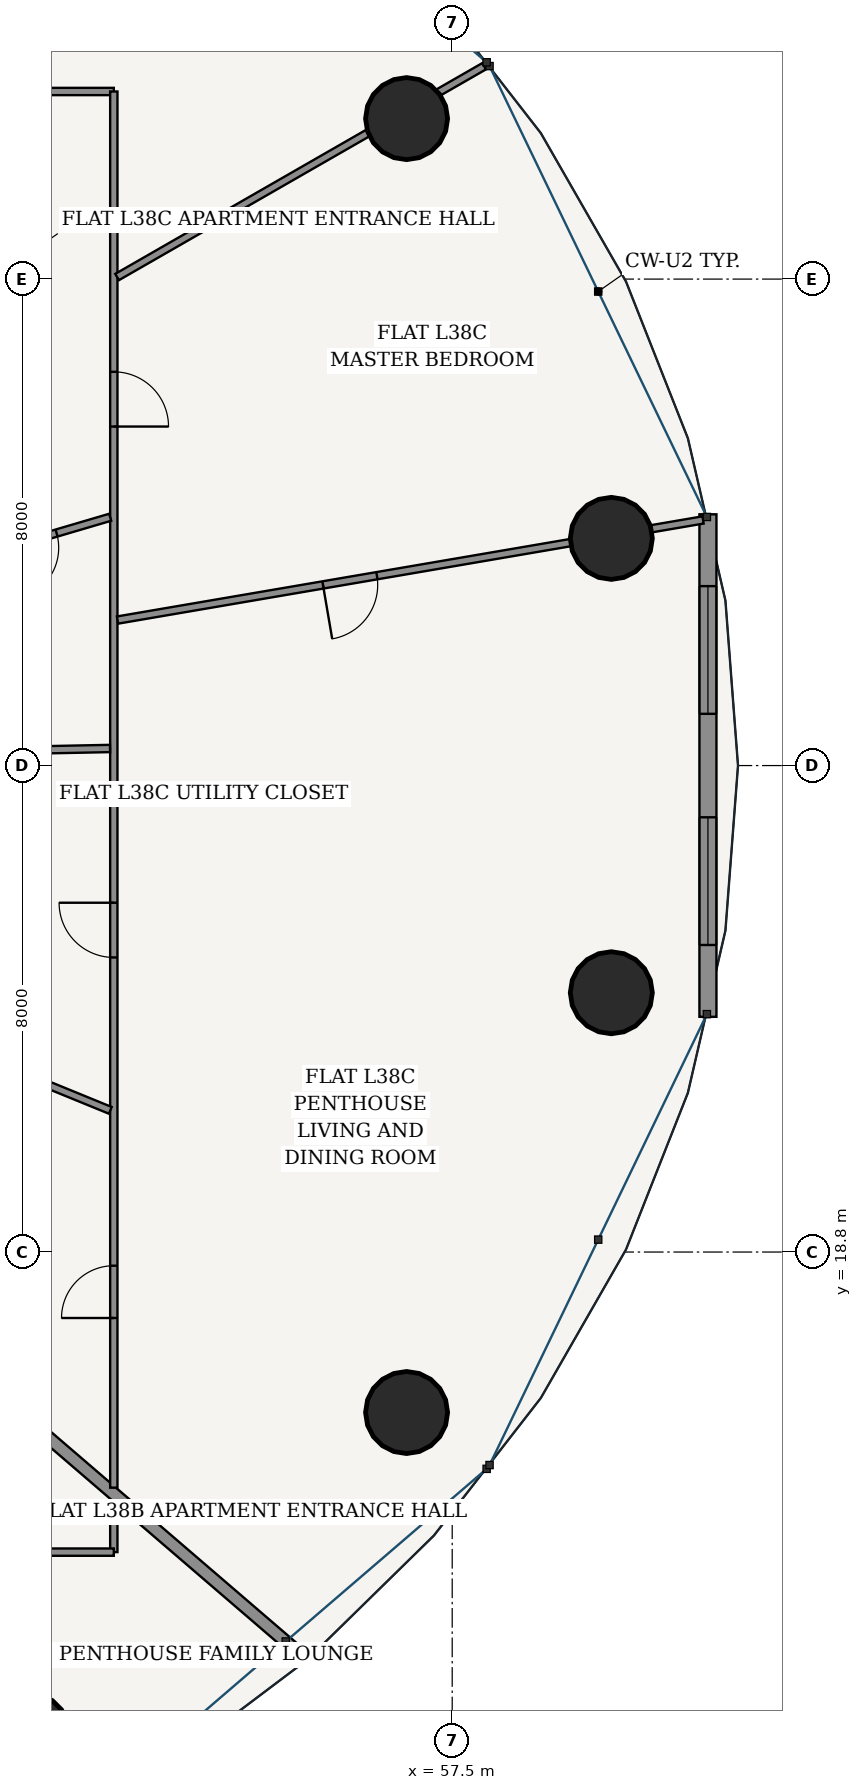
"""IFC4 building model, lengths in metres.
Left out: names, types, materials, properties, quantities, classifications, styles, units other than length and angle.
Written with IfcOpenShell. Run it as: python <this file> out.ifc"""

import sys

from ifc_helpers import new_model, si_unit, direction, frame, frame_2d, origin, origin_2d, place, context, subcontext, project, spatial, rectangle, hollow_circle, extrude, source, transform, mapped, element, fill, save


model = new_model("IFC4")
c1 = context("Model", 3, precision=1e-05, world=origin(), true_north=direction((-0.2419218956, 0.970295726276)))
c2 = subcontext(c1, "Body", "Model", "MODEL_VIEW")
j1 = project(units=[si_unit("LENGTHUNIT", "METRE"), si_unit("PLANEANGLEUNIT", "RADIAN")], contexts=[c1])
p1 = place(None, origin())
s1 = spatial("IfcSite", under=j1, at=p1, CompositionType="ELEMENT")
p2 = place(p1, origin())
s2 = spatial("IfcBuilding", under=s1, at=p2, CompositionType="ELEMENT")
p3 = place(p2, frame((0.0, 0.0, 146.2)))
s3 = spatial("IfcBuildingStorey", under=s2, at=p3, CompositionType="ELEMENT", Elevation=146.2)
for number, where, z_axis, x_axis in (
    (1, (60.117, 30.536, 0.0), (0.0, 0.0, 1.0), (1.0, 0.0, 0.0)),
    (2, (56.75, 37.439, 0.0), (0.0, 0.0, 1.0), (1.0, 0.0, 0.0)),
    (3, (50.528, 10.877, 0.0), (0.0, 0.0, 1.0), (1.0, 0.0, 0.0)),
    (4, (56.75, 16.161, 0.0), (0.0, 0.0, 1.0), (1.0, 0.0, 0.0)),
    (5, (60.117, 23.064, 0.0), (0.0, 0.0, 1.0), (1.0, 0.0, 0.0)),
):
    element("IfcColumn", number, at=place(p3, frame(where, z_axis=z_axis, x_axis=x_axis)), inside=s3, PredefinedType="COLUMN", context=c2, shape_type="SweptSolid", body=[
        extrude(hollow_circle(Radius=0.675, WallThickness=0.042, at=origin_2d()), origin(), (0.0, 0.0, 1.0), 3.6),
    ])
p4 = place(p3, frame((61.706, 22.668, 0.0), z_axis=(0.0, 0.0, 1.0), x_axis=(0.0, 1.0, 0.0)))
e6 = element("IfcWall", 6, at=p4, inside=s3, PredefinedType="SOLIDWALL", context=c2, shape_type="SweptSolid", body=[
    extrude(rectangle(XDim=8.264, YDim=0.28, at=frame_2d((4.132, 0.0))), origin(), (0.0, 0.0, 1.0), 3.33),
])
p5 = place(p4, frame((1.181, 0.0, 0.85)))
e7 = element("IfcOpeningElement", 7, at=p5, cuts=e6, PredefinedType="OPENING", context=c2, shape_type="SweptSolid", body=[
    extrude(rectangle(XDim=2.1, YDim=1.95, at=frame_2d((1.05, 0.975))), frame((0.0, 0.15, 0.0), z_axis=(0.0, -1.0, 0.0), x_axis=(1.0, 0.0, 0.0)), (0.0, 0.0, 1.0), 0.3),
])
p6 = place(p4, frame((4.983, 0.0, 0.85)))
e8 = element("IfcOpeningElement", 8, at=p6, cuts=e6, PredefinedType="OPENING", context=c2, shape_type="SweptSolid", body=[
    extrude(rectangle(XDim=2.1, YDim=1.95, at=frame_2d((1.05, 0.975))), frame((0.0, 0.15, 0.0), z_axis=(0.0, -1.0, 0.0), x_axis=(1.0, 0.0, 0.0)), (0.0, 0.0, 1.0), 0.3),
])
p7 = place(p3, frame((51.935, 14.721, 0.0), z_axis=(0.0, 0.0, 1.0), x_axis=(0.0, -1.0, 0.0)))
e9 = element("IfcWall", 9, at=p7, inside=s3, PredefinedType="PARTITIONING", context=c2, shape_type="SweptSolid", body=[
    extrude(rectangle(XDim=0.856, YDim=0.12, at=frame_2d((0.428, 0.0))), origin(), (0.0, 0.0, 1.0), 3.33),
])
p8 = place(p3, frame((51.935, 13.865, 0.0), z_axis=(0.0, 0.0, 1.0), x_axis=(-1.0, 0.0, 0.0)))
e10 = element("IfcWall", 10, at=p8, inside=s3, PredefinedType="PARTITIONING", context=c2, shape_type="SweptSolid", body=[
    extrude(rectangle(XDim=20.345, YDim=0.12, at=frame_2d((10.172, 0.0))), origin(), (0.0, 0.0, 1.0), 2.776),
])
p9 = place(p8, frame((2.985, 0.0, 0.0)))
e11 = element("IfcOpeningElement", 11, at=p9, cuts=e10, PredefinedType="OPENING", context=c2, shape_type="SweptSolid", body=[
    extrude(rectangle(XDim=0.9, YDim=2.15, at=frame_2d((0.45, 1.075))), frame((0.0, 0.07, 0.0), z_axis=(0.0, -1.0, 0.0), x_axis=(1.0, 0.0, 0.0)), (0.0, 0.0, 1.0), 0.14),
])
p10 = place(p8, frame((12.333, 0.0, 0.0)))
e12 = element("IfcOpeningElement", 12, at=p10, cuts=e10, PredefinedType="OPENING", context=c2, shape_type="SweptSolid", body=[
    extrude(rectangle(XDim=0.9, YDim=2.15, at=frame_2d((0.45, 1.075))), frame((0.0, 0.07, 0.0), z_axis=(0.0, -1.0, 0.0), x_axis=(1.0, 0.0, 0.0)), (0.0, 0.0, 1.0), 0.14),
])
p11 = place(p8, frame((18.436, 0.0, 0.0)))
e13 = element("IfcOpeningElement", 13, at=p11, cuts=e10, PredefinedType="OPENING", context=c2, shape_type="SweptSolid", body=[
    extrude(rectangle(XDim=0.9, YDim=2.15, at=frame_2d((0.45, 1.075))), frame((0.0, 0.07, 0.0), z_axis=(0.0, -1.0, 0.0), x_axis=(1.0, 0.0, 0.0)), (0.0, 0.0, 1.0), 0.14),
])
p12 = place(p3, frame((49.287, 17.099, 0.0), z_axis=(0.0, 0.0, 1.0), x_axis=(0.758362300646, -0.651833276965, 0.0)))
e14 = element("IfcWall", 14, at=p12, inside=s3, PredefinedType="PARTITIONING", context=c2, shape_type="SweptSolid", body=[
    extrude(rectangle(XDim=7.618, YDim=0.2, at=frame_2d((3.809, 0.0))), origin(), (0.0, 0.0, 1.0), 2.846),
])
p13 = place(p3, frame((44.465, 37.885, 0.0), z_axis=(0.0, 0.0, 1.0), x_axis=(1.0, 0.0, 0.0)))
e15 = element("IfcWall", 15, at=p13, inside=s3, PredefinedType="PARTITIONING", context=c2, shape_type="SweptSolid", body=[
    extrude(rectangle(XDim=7.47, YDim=0.12, at=frame_2d((3.735, 0.0))), origin(), (0.0, 0.0, 1.0), 2.776),
])
p14 = place(p13, frame((0.778, 0.0, 0.0)))
e16 = element("IfcOpeningElement", 16, at=p14, cuts=e15, PredefinedType="OPENING", context=c2, shape_type="SweptSolid", body=[
    extrude(rectangle(XDim=0.9, YDim=2.15, at=frame_2d((0.45, 1.075))), frame((0.0, 0.07, 0.0), z_axis=(0.0, -1.0, 0.0), x_axis=(1.0, 0.0, 0.0)), (0.0, 0.0, 1.0), 0.14),
])
p15 = place(p3, frame((51.935, 37.885, 0.0), z_axis=(0.0, 0.0, 1.0), x_axis=(0.0, -1.0, 0.0)))
e17 = element("IfcWall", 17, at=p15, inside=s3, PredefinedType="PARTITIONING", context=c2, shape_type="SweptSolid", body=[
    extrude(rectangle(XDim=22.96, YDim=0.12, at=frame_2d((11.48, 0.0))), origin(), (0.0, 0.0, 1.0), 2.776),
])
p16 = place(p15, frame((4.61, 0.0, 0.0)))
e18 = element("IfcOpeningElement", 18, at=p16, cuts=e17, PredefinedType="OPENING", context=c2, shape_type="SweptSolid", body=[
    extrude(rectangle(XDim=0.9, YDim=2.15, at=frame_2d((0.45, 1.075))), frame((0.0, 0.07, 0.0), z_axis=(0.0, -1.0, 0.0), x_axis=(1.0, 0.0, 0.0)), (0.0, 0.0, 1.0), 0.14),
])
p17 = place(p15, frame((19.31, 0.0, 0.0)))
e19 = element("IfcOpeningElement", 19, at=p17, cuts=e17, PredefinedType="OPENING", context=c2, shape_type="SweptSolid", body=[
    extrude(rectangle(XDim=0.86, YDim=2.15, at=frame_2d((0.43, 1.075))), frame((0.0, 0.07, 0.0), z_axis=(0.0, -1.0, 0.0), x_axis=(1.0, 0.0, 0.0)), (0.0, 0.0, 1.0), 0.14),
])
p18 = place(p15, frame((13.341, 0.0, 0.0)))
e20 = element("IfcOpeningElement", 20, at=p18, cuts=e17, PredefinedType="OPENING", context=c2, shape_type="SweptSolid", body=[
    extrude(rectangle(XDim=0.9, YDim=2.15, at=frame_2d((0.45, 1.075))), frame((0.0, 0.07, 0.0), z_axis=(0.0, -1.0, 0.0), x_axis=(1.0, 0.0, 0.0)), (0.0, 0.0, 1.0), 0.14),
])
p19 = place(p3, frame((51.996, 29.193, 0.0), z_axis=(0.0, 0.0, 1.0), x_axis=(0.985698378271, 0.168519159369, 0.0)))
e21 = element("IfcWall", 21, at=p19, inside=s3, PredefinedType="PARTITIONING", context=c2, shape_type="SweptSolid", body=[
    extrude(rectangle(XDim=9.769, YDim=0.12, at=frame_2d((4.884, 0.0))), origin(), (0.0, 0.0, 1.0), 2.776),
])
p20 = place(p19, frame((3.428, 0.0, 0.0)))
e22 = element("IfcOpeningElement", 22, at=p20, cuts=e21, PredefinedType="OPENING", context=c2, shape_type="SweptSolid", body=[
    extrude(rectangle(XDim=0.9, YDim=2.15, at=frame_2d((0.45, 1.075))), frame((0.0, 0.07, 0.0), z_axis=(0.0, -1.0, 0.0), x_axis=(1.0, 0.0, 0.0)), (0.0, 0.0, 1.0), 0.14),
])
p21 = place(p3, frame((51.989, 34.834, 0.0), z_axis=(0.0, 0.0, 1.0), x_axis=(0.86717064002, 0.498011125466, 0.0)))
e23 = element("IfcWall", 23, at=p21, inside=s3, PredefinedType="PARTITIONING", context=c2, shape_type="SweptSolid", body=[
    extrude(rectangle(XDim=6.961, YDim=0.12, at=frame_2d((3.48, 0.0))), origin(), (0.0, 0.0, 1.0), 2.776),
])
p22 = place(p3, frame((46.656, 37.934, 0.0), z_axis=(0.0, 0.0, 1.0), x_axis=(0.613758289074, 0.789493991487, 0.0)))
e24 = element("IfcWall", 24, at=p22, inside=s3, PredefinedType="PARTITIONING", context=c2, shape_type="SweptSolid", body=[
    extrude(rectangle(XDim=7.695, YDim=0.12, at=frame_2d((3.848, 0.0))), origin(), (0.0, 0.0, 1.0), 2.776),
])
p23 = place(p22, frame((2.395, 0.0, 0.0)))
e25 = element("IfcOpeningElement", 25, at=p23, cuts=e24, PredefinedType="OPENING", context=c2, shape_type="SweptSolid", body=[
    extrude(rectangle(XDim=0.9, YDim=2.15, at=frame_2d((0.45, 1.075))), frame((0.0, 0.07, 0.0), z_axis=(0.0, -1.0, 0.0), x_axis=(1.0, 0.0, 0.0)), (0.0, 0.0, 1.0), 0.14),
])
p24 = place(p3, frame((49.287, 22.188, 0.0), z_axis=(0.0, 0.0, 1.0), x_axis=(0.925708058909, -0.378238799796, 0.0)))
e26 = element("IfcWall", 26, at=p24, inside=s3, PredefinedType="PARTITIONING", context=c2, shape_type="SweptSolid", body=[
    extrude(rectangle(XDim=2.799, YDim=0.12, at=frame_2d((1.399, 0.0))), origin(), (0.0, 0.0, 1.0), 3.33),
])
p25 = place(p3, frame((49.287, 27.029, 0.0), z_axis=(0.0, 0.0, 1.0), x_axis=(0.999794052369, 0.020294157974, 0.0)))
e27 = element("IfcWall", 27, at=p25, inside=s3, PredefinedType="PARTITIONING", context=c2, shape_type="SweptSolid", body=[
    extrude(rectangle(XDim=2.586, YDim=0.12, at=frame_2d((1.293, 0.0))), origin(), (0.0, 0.0, 1.0), 3.33),
])
p26 = place(p3, frame((49.287, 30.121, 0.0), z_axis=(0.0, 0.0, 1.0), x_axis=(0.959304970846, 0.282372046969, 0.0)))
e28 = element("IfcWall", 28, at=p26, inside=s3, PredefinedType="PARTITIONING", context=c2, shape_type="SweptSolid", body=[
    extrude(rectangle(XDim=2.698, YDim=0.12, at=frame_2d((1.349, 0.0))), origin(), (0.0, 0.0, 1.0), 3.33),
])
p27 = place(p26, frame((0.919, 0.0, 0.0)))
e29 = element("IfcOpeningElement", 29, at=p27, cuts=e28, PredefinedType="OPENING", context=c2, shape_type="SweptSolid", body=[
    extrude(rectangle(XDim=0.86, YDim=2.15, at=frame_2d((0.43, 1.075))), frame((0.0, 0.07, 0.0), z_axis=(0.0, -1.0, 0.0), x_axis=(1.0, 0.0, 0.0)), (0.0, 0.0, 1.0), 0.14),
])
m1 = source(origin(), c2, "Body", "SweptSolid", [
    extrude(rectangle(XDim=2.1, YDim=1.95, at=frame_2d((1.05, 0.975))), frame((0.0, 0.03, 0.0), z_axis=(0.0, -1.0, 0.0), x_axis=(1.0, 0.0, 0.0)), (0.0, 0.0, 1.0), 0.06),
])
p28 = place(p5, origin())
e30 = element("IfcWindow", 30, at=p28, inside=s3, PartitioningType="SINGLE_PANEL", PredefinedType="WINDOW", context=c2, shape_type="MappedRepresentation", body=[
    mapped(m1, transform((0.0, 0.0, 0.0), scale=1.0)),
])
fill(e7, e30)
p29 = place(p6, origin())
e31 = element("IfcWindow", 31, at=p29, inside=s3, PartitioningType="SINGLE_PANEL", PredefinedType="WINDOW", context=c2, shape_type="MappedRepresentation", body=[
    mapped(m1, transform((0.0, 0.0, 0.0), scale=1.0)),
])
fill(e8, e31)
m2 = source(origin(), c2, "Body", "SweptSolid", [
    extrude(rectangle(XDim=0.86, YDim=2.15, at=frame_2d((0.43, 1.075))), frame((0.0, 0.025, 0.0), z_axis=(0.0, -1.0, 0.0), x_axis=(1.0, 0.0, 0.0)), (0.0, 0.0, 1.0), 0.05),
])
p30 = place(p27, frame((0.86, 0.0, 0.0), z_axis=(0.0, 0.0, 1.0), x_axis=(-1.0, 0.0, 0.0)))
e32 = element("IfcDoor", 32, at=p30, inside=s3, OperationType="SINGLE_SWING_RIGHT", PredefinedType="DOOR", context=c2, shape_type="MappedRepresentation", body=[
    mapped(m2, transform((0.0, 0.0, 0.0), scale=1.0)),
])
fill(e29, e32)
m3 = source(origin(), c2, "Body", "SweptSolid", [
    extrude(rectangle(XDim=0.9, YDim=2.15, at=frame_2d((0.45, 1.075))), frame((0.0, 0.025, 0.0), z_axis=(0.0, -1.0, 0.0), x_axis=(1.0, 0.0, 0.0)), (0.0, 0.0, 1.0), 0.05),
])
p31 = place(p16, origin())
e33 = element("IfcDoor", 33, at=p31, inside=s3, OperationType="SINGLE_SWING_RIGHT", PredefinedType="DOOR", context=c2, shape_type="MappedRepresentation", body=[
    mapped(m3, transform((0.0, 0.0, 0.0), scale=1.0)),
])
fill(e18, e33)
p32 = place(p20, frame((0.9, 0.0, 0.0), z_axis=(0.0, 0.0, 1.0), x_axis=(-1.0, 0.0, 0.0)))
e34 = element("IfcDoor", 34, at=p32, inside=s3, OperationType="SINGLE_SWING_RIGHT", PredefinedType="DOOR", context=c2, shape_type="MappedRepresentation", body=[
    mapped(m3, transform((0.0, 0.0, 0.0), scale=1.0)),
])
fill(e22, e34)
p33 = place(p17, frame((0.86, 0.0, 0.0), z_axis=(0.0, 0.0, 1.0), x_axis=(-1.0, 0.0, 0.0)))
e35 = element("IfcDoor", 35, at=p33, inside=s3, OperationType="SINGLE_SWING_LEFT", PredefinedType="DOOR", context=c2, shape_type="MappedRepresentation", body=[
    mapped(m2, transform((0.0, 0.0, 0.0), scale=1.0)),
])
fill(e19, e35)
p34 = place(p18, frame((0.9, 0.0, 0.0), z_axis=(0.0, 0.0, 1.0), x_axis=(-1.0, 0.0, 0.0)))
e36 = element("IfcDoor", 36, at=p34, inside=s3, OperationType="SINGLE_SWING_RIGHT", PredefinedType="DOOR", context=c2, shape_type="MappedRepresentation", body=[
    mapped(m3, transform((0.0, 0.0, 0.0), scale=1.0)),
])
fill(e20, e36)
save(model, sys.argv[1])
